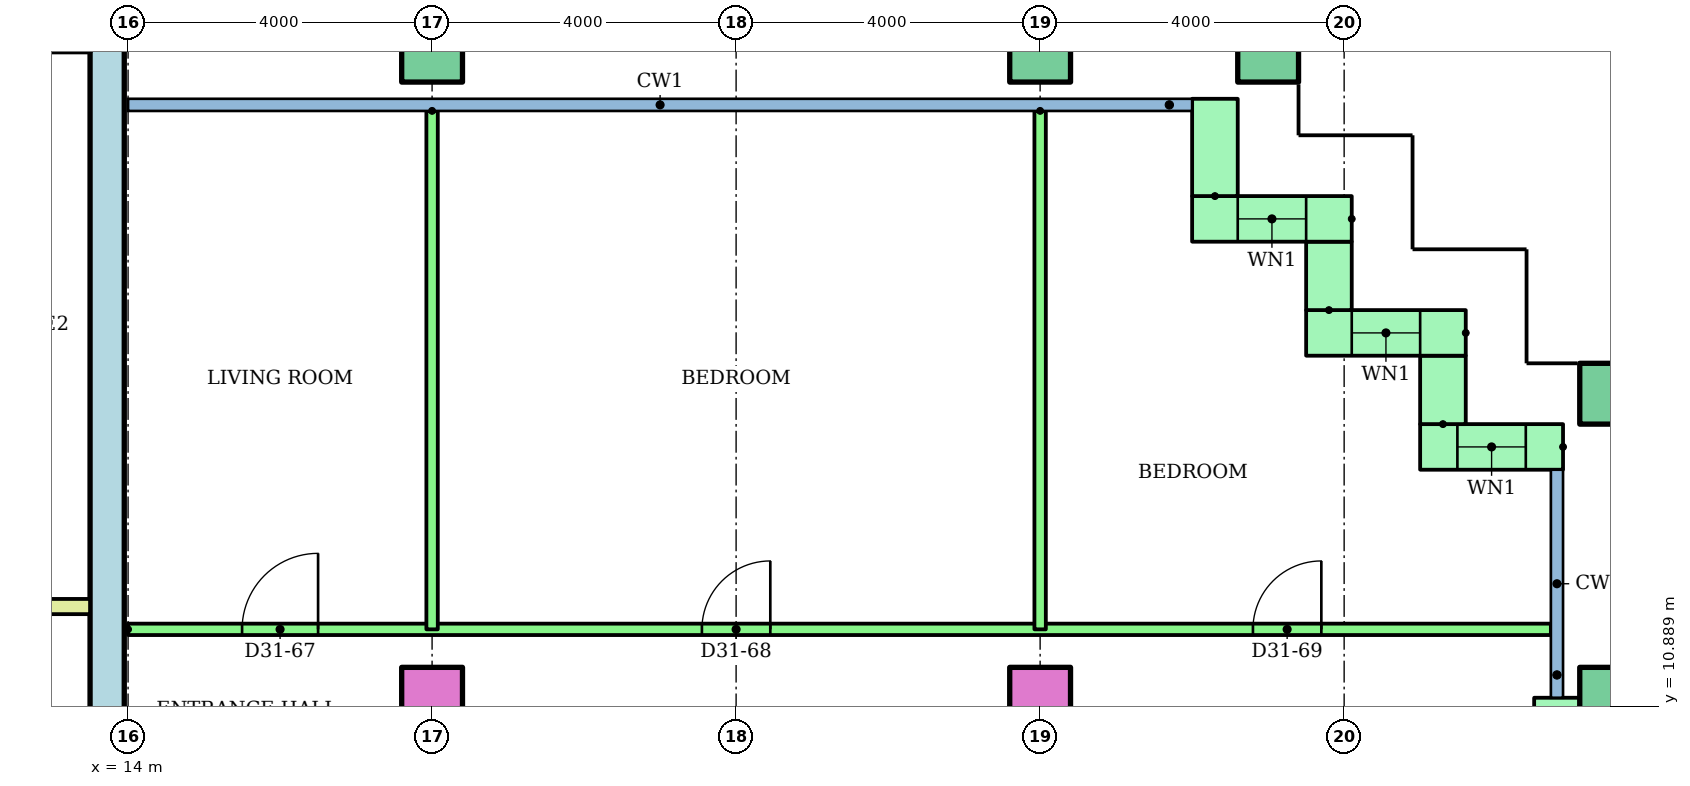
"""IFC4 building model, lengths in metres.
Left out: names, types, materials, properties, quantities, classifications, styles, units other than length and angle.
Written with IfcOpenShell. Run it as: python <this file> out.ifc"""

import sys

from ifc_helpers import new_model, si_unit, direction, frame, frame_2d, origin, origin_2d, place, context, subcontext, project, spatial, rectangle, hollow_rectangle, extrude, element, fill, save


model = new_model("IFC4")
c1 = context("Model", 3, precision=1e-05, world=origin(), true_north=direction((0.0, 1.0)))
c2 = subcontext(c1, "Body", "Model", "MODEL_VIEW")
j1 = project(units=[si_unit("LENGTHUNIT", "METRE"), si_unit("PLANEANGLEUNIT", "RADIAN")], contexts=[c1])
p1 = place(None, origin())
s1 = spatial("IfcSite", under=j1, at=p1, CompositionType="ELEMENT")
p2 = place(p1, origin())
s2 = spatial("IfcBuilding", under=s1, at=p2, CompositionType="ELEMENT")
p3 = place(p2, frame((0.0, 0.0, 123.0)))
s3 = spatial("IfcBuildingStorey", under=s2, at=p3, CompositionType="ELEMENT", Elevation=123.0)
for number, where in (
    (1, (18.0, 11.0, 0.0)),
    (2, (26.0, 11.0, 0.0)),
):
    element("IfcColumn", number, at=place(p3, frame(where)), inside=s3, PredefinedType="COLUMN", context=c2, shape_type="SweptSolid", body=[
        extrude(rectangle(XDim=0.8, YDim=0.8, at=origin_2d()), origin(), (0.0, 0.0, 1.0), 3.2),
    ])
for number, where in (
    (3, (33.5, 11.0, 0.0)),
    (4, (33.5, 15.0, 0.0)),
    (5, (18.0, 19.5, 0.0)),
    (6, (26.0, 19.5, 0.0)),
    (7, (29.0, 19.5, 0.0)),
):
    element("IfcColumn", number, at=place(p3, frame(where)), inside=s3, PredefinedType="COLUMN", context=c2, shape_type="SweptSolid", body=[
        extrude(hollow_rectangle(XDim=0.8, YDim=0.8, WallThickness=0.04, at=origin_2d()), origin(), (0.0, 0.0, 1.0), 3.2),
    ])
p4 = place(p3, frame((32.88, 14.3, 0.0), z_axis=(0.0, 0.0, 1.0), x_axis=(-1.0, 0.0, 0.0)))
e8 = element("IfcWall", 8, at=p4, inside=s3, PredefinedType="STANDARD", context=c2, shape_type="SweptSolid", body=[
    extrude(rectangle(XDim=1.88, YDim=0.6, at=frame_2d((0.94, 0.0))), origin(), (0.0, 0.0, 1.0), 2.92),
])
p5 = place(p4, frame((0.49, 0.0, 0.9)))
e9 = element("IfcOpeningElement", 9, at=p5, cuts=e8, PredefinedType="OPENING", context=c2, shape_type="SweptSolid", body=[
    extrude(rectangle(XDim=0.9, YDim=1.5, at=frame_2d((0.45, 0.75))), frame((0.0, 0.31, 0.0), z_axis=(0.0, -1.0, 0.0), x_axis=(1.0, 0.0, 0.0)), (0.0, 0.0, 1.0), 0.62),
])
p6 = place(p3, frame((31.3, 14.6, 0.0), z_axis=(0.0, 0.0, 1.0), x_axis=(0.0, 1.0, 0.0)))
e10 = element("IfcWall", 10, at=p6, inside=s3, PredefinedType="STANDARD", context=c2, shape_type="SweptSolid", body=[
    extrude(rectangle(XDim=0.9, YDim=0.6, at=frame_2d((0.45, 0.0))), origin(), (0.0, 0.0, 1.0), 2.92),
])
p7 = place(p3, frame((31.6, 15.8, 0.0), z_axis=(0.0, 0.0, 1.0), x_axis=(-1.0, 0.0, 0.0)))
e11 = element("IfcWall", 11, at=p7, inside=s3, PredefinedType="STANDARD", context=c2, shape_type="SweptSolid", body=[
    extrude(rectangle(XDim=2.1, YDim=0.6, at=frame_2d((1.05, 0.0))), origin(), (0.0, 0.0, 1.0), 2.92),
])
p8 = place(p7, frame((0.6, 0.0, 0.9)))
e12 = element("IfcOpeningElement", 12, at=p8, cuts=e11, PredefinedType="OPENING", context=c2, shape_type="SweptSolid", body=[
    extrude(rectangle(XDim=0.9, YDim=1.5, at=frame_2d((0.45, 0.75))), frame((0.0, 0.31, 0.0), z_axis=(0.0, -1.0, 0.0), x_axis=(1.0, 0.0, 0.0)), (0.0, 0.0, 1.0), 0.62),
])
p9 = place(p3, frame((29.8, 16.1, 0.0), z_axis=(0.0, 0.0, 1.0), x_axis=(0.0, 1.0, 0.0)))
e13 = element("IfcWall", 13, at=p9, inside=s3, PredefinedType="STANDARD", context=c2, shape_type="SweptSolid", body=[
    extrude(rectangle(XDim=0.9, YDim=0.6, at=frame_2d((0.45, 0.0))), origin(), (0.0, 0.0, 1.0), 2.92),
])
p10 = place(p3, frame((30.1, 17.3, 0.0), z_axis=(0.0, 0.0, 1.0), x_axis=(-1.0, 0.0, 0.0)))
e14 = element("IfcWall", 14, at=p10, inside=s3, PredefinedType="STANDARD", context=c2, shape_type="SweptSolid", body=[
    extrude(rectangle(XDim=2.1, YDim=0.6, at=frame_2d((1.05, 0.0))), origin(), (0.0, 0.0, 1.0), 2.92),
])
p11 = place(p10, frame((0.6, 0.0, 0.9)))
e15 = element("IfcOpeningElement", 15, at=p11, cuts=e14, PredefinedType="OPENING", context=c2, shape_type="SweptSolid", body=[
    extrude(rectangle(XDim=0.9, YDim=1.5, at=frame_2d((0.45, 0.75))), frame((0.0, 0.31, 0.0), z_axis=(0.0, -1.0, 0.0), x_axis=(1.0, 0.0, 0.0)), (0.0, 0.0, 1.0), 0.62),
])
p12 = place(p3, frame((28.3, 17.6, 0.0), z_axis=(0.0, 0.0, 1.0), x_axis=(0.0, 1.0, 0.0)))
e16 = element("IfcWall", 16, at=p12, inside=s3, PredefinedType="STANDARD", context=c2, shape_type="SweptSolid", body=[
    extrude(rectangle(XDim=1.28, YDim=0.6, at=frame_2d((0.64, 0.0))), origin(), (0.0, 0.0, 1.0), 2.92),
])
p13 = place(p3, frame((32.8, 6.5, 0.0), z_axis=(0.0, 0.0, 1.0), x_axis=(0.0, 1.0, 0.0)))
e17 = element("IfcWall", 17, at=p13, inside=s3, PredefinedType="STANDARD", context=c2, shape_type="SweptSolid", body=[
    extrude(rectangle(XDim=4.5, YDim=0.6, at=frame_2d((2.25, 0.0))), origin(), (0.0, 0.0, 1.0), 2.92),
])
p14 = place(p13, frame((1.65, 0.0, 0.0)))
e18 = element("IfcOpeningElement", 18, at=p14, cuts=e17, PredefinedType="OPENING", context=c2, shape_type="SweptSolid", body=[
    extrude(rectangle(XDim=1.2, YDim=2.1, at=frame_2d((0.6, 1.05))), frame((0.0, 0.31, 0.0), z_axis=(0.0, -1.0, 0.0), x_axis=(1.0, 0.0, 0.0)), (0.0, 0.0, 1.0), 0.62),
])
p15 = place(p3, frame((13.725, 3.0, 0.0), z_axis=(0.0, 0.0, 1.0), x_axis=(0.0, 1.0, 0.0)))
e19 = element("IfcWall", 19, at=p15, inside=s3, PredefinedType="SHEAR", context=c2, shape_type="SweptSolid", body=[
    extrude(rectangle(XDim=17.0, YDim=0.45, at=frame_2d((8.5, 0.0))), origin(), (0.0, 0.0, 1.0), 2.92),
])
p16 = place(p3, frame((9.6, 12.2, 0.0)))
e20 = element("IfcWall", 20, at=p16, inside=s3, PredefinedType="PARTITIONING", context=c2, shape_type="SweptSolid", body=[
    extrude(rectangle(XDim=3.9, YDim=0.2, at=frame_2d((1.95, 0.0))), origin(), (0.0, 0.0, 1.0), 2.92),
])
p17 = place(p3, frame((14.0, 11.9, 0.0)))
e21 = element("IfcWall", 21, at=p17, inside=s3, PredefinedType="PARTITIONING", context=c2, shape_type="SweptSolid", body=[
    extrude(rectangle(XDim=18.72, YDim=0.15, at=frame_2d((9.36, 0.0))), origin(), (0.0, 0.0, 1.0), 2.4),
])
p18 = place(p17, frame((1.5, 0.0, 0.0)))
e22 = element("IfcOpeningElement", 22, at=p18, cuts=e21, PredefinedType="OPENING", context=c2, shape_type="SweptSolid", body=[
    extrude(rectangle(XDim=1.0, YDim=2.1, at=frame_2d((0.5, 1.05))), frame((0.0, 0.085, 0.0), z_axis=(0.0, -1.0, 0.0), x_axis=(1.0, 0.0, 0.0)), (0.0, 0.0, 1.0), 0.17),
])
p19 = place(p17, frame((7.55, 0.0, 0.0)))
e23 = element("IfcOpeningElement", 23, at=p19, cuts=e21, PredefinedType="OPENING", context=c2, shape_type="SweptSolid", body=[
    extrude(rectangle(XDim=0.9, YDim=2.1, at=frame_2d((0.45, 1.05))), frame((0.0, 0.085, 0.0), z_axis=(0.0, -1.0, 0.0), x_axis=(1.0, 0.0, 0.0)), (0.0, 0.0, 1.0), 0.17),
])
p20 = place(p17, frame((14.8, 0.0, 0.0)))
e24 = element("IfcOpeningElement", 24, at=p20, cuts=e21, PredefinedType="OPENING", context=c2, shape_type="SweptSolid", body=[
    extrude(rectangle(XDim=0.9, YDim=2.1, at=frame_2d((0.45, 1.05))), frame((0.0, 0.085, 0.0), z_axis=(0.0, -1.0, 0.0), x_axis=(1.0, 0.0, 0.0)), (0.0, 0.0, 1.0), 0.17),
])
for number, where, z_axis, x_axis in (
    (25, (18.0, 18.721, 0.0), (0.0, 0.0, 1.0), (0.0, -1.0, 0.0)),
    (26, (26.0, 18.721, 0.0), (0.0, 0.0, 1.0), (0.0, -1.0, 0.0)),
):
    element("IfcWall", number, at=place(p3, frame(where, z_axis=z_axis, x_axis=x_axis)), inside=s3, PredefinedType="PARTITIONING", context=c2, shape_type="SweptSolid", body=[
        extrude(rectangle(XDim=6.821, YDim=0.15, at=frame_2d((3.411, 0.0))), origin(), (0.0, 0.0, 1.0), 2.4),
    ])
p21 = place(p5, origin())
e27 = element("IfcWindow", 27, at=p21, inside=s3, PartitioningType="SINGLE_PANEL", PredefinedType="WINDOW", context=c2, shape_type="SweptSolid", body=[
    extrude(rectangle(XDim=0.9, YDim=1.5, at=frame_2d((0.45, 0.75))), frame((0.0, 0.03, 0.0), z_axis=(0.0, -1.0, 0.0), x_axis=(1.0, 0.0, 0.0)), (0.0, 0.0, 1.0), 0.06),
])
fill(e9, e27)
p22 = place(p8, origin())
e28 = element("IfcWindow", 28, at=p22, inside=s3, PartitioningType="SINGLE_PANEL", PredefinedType="WINDOW", context=c2, shape_type="SweptSolid", body=[
    extrude(rectangle(XDim=0.9, YDim=1.5, at=frame_2d((0.45, 0.75))), frame((0.0, 0.03, 0.0), z_axis=(0.0, -1.0, 0.0), x_axis=(1.0, 0.0, 0.0)), (0.0, 0.0, 1.0), 0.06),
])
fill(e12, e28)
p23 = place(p11, origin())
e29 = element("IfcWindow", 29, at=p23, inside=s3, PartitioningType="SINGLE_PANEL", PredefinedType="WINDOW", context=c2, shape_type="SweptSolid", body=[
    extrude(rectangle(XDim=0.9, YDim=1.5, at=frame_2d((0.45, 0.75))), frame((0.0, 0.03, 0.0), z_axis=(0.0, -1.0, 0.0), x_axis=(1.0, 0.0, 0.0)), (0.0, 0.0, 1.0), 0.06),
])
fill(e15, e29)
p24 = place(p18, origin())
e30 = element("IfcDoor", 30, at=p24, inside=s3, OperationType="SINGLE_SWING_RIGHT", PredefinedType="DOOR", context=c2, shape_type="SweptSolid", body=[
    extrude(rectangle(XDim=1.0, YDim=2.1, at=frame_2d((0.5, 1.05))), frame((0.0, 0.025, 0.0), z_axis=(0.0, -1.0, 0.0), x_axis=(1.0, 0.0, 0.0)), (0.0, 0.0, 1.0), 0.05),
])
fill(e22, e30)
p25 = place(p19, origin())
e31 = element("IfcDoor", 31, at=p25, inside=s3, OperationType="SINGLE_SWING_RIGHT", PredefinedType="DOOR", context=c2, shape_type="SweptSolid", body=[
    extrude(rectangle(XDim=0.9, YDim=2.1, at=frame_2d((0.45, 1.05))), frame((0.0, 0.025, 0.0), z_axis=(0.0, -1.0, 0.0), x_axis=(1.0, 0.0, 0.0)), (0.0, 0.0, 1.0), 0.05),
])
fill(e23, e31)
p26 = place(p20, origin())
e32 = element("IfcDoor", 32, at=p26, inside=s3, OperationType="SINGLE_SWING_RIGHT", PredefinedType="DOOR", context=c2, shape_type="SweptSolid", body=[
    extrude(rectangle(XDim=0.9, YDim=2.1, at=frame_2d((0.45, 1.05))), frame((0.0, 0.025, 0.0), z_axis=(0.0, -1.0, 0.0), x_axis=(1.0, 0.0, 0.0)), (0.0, 0.0, 1.0), 0.05),
])
fill(e24, e32)
save(model, sys.argv[1])
